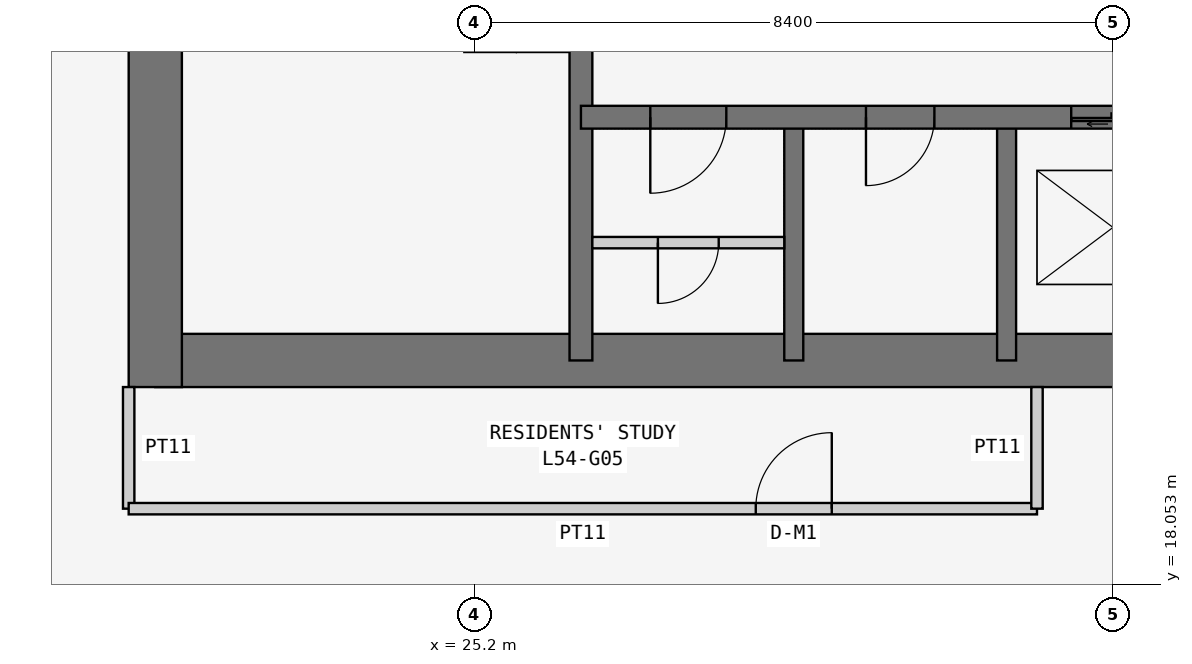
"""IFC4 building model, lengths in metres.
Left out: names, types, materials, properties, quantities, classifications, styles, units other than length and angle.
Written with IfcOpenShell. Run it as: python <this file> out.ifc"""

import sys

from ifc_helpers import new_model, si_unit, direction, frame, frame_2d, origin, place, context, subcontext, project, spatial, rectangle, extrude, element, fill, save


model = new_model("IFC4")
c1 = context("Model", 3, precision=1e-05, world=origin(), true_north=direction((0.0, 1.0)))
c2 = subcontext(c1, "Body", "Model", "MODEL_VIEW")
j1 = project(units=[si_unit("LENGTHUNIT", "METRE"), si_unit("PLANEANGLEUNIT", "RADIAN")], contexts=[c1])
p1 = place(None, origin())
s1 = spatial("IfcSite", under=j1, at=p1, CompositionType="ELEMENT")
p2 = place(p1, origin())
s2 = spatial("IfcBuilding", under=s1, at=p2, CompositionType="ELEMENT")
p3 = place(p2, frame((0.0, 0.0, 208.5)))
s3 = spatial("IfcBuildingStorey", under=s2, at=p3, CompositionType="ELEMENT", Elevation=208.5)
p4 = place(p3, frame((21.0, 21.0, 0.0), z_axis=(0.0, 0.0, 1.0), x_axis=(1.0, 0.0, 0.0)))
e1 = element("IfcWall", 1, at=p4, inside=s3, PredefinedType="SHEAR", context=c2, shape_type="SweptSolid", body=[
    extrude(rectangle(XDim=17.15, YDim=0.7, at=frame_2d((8.575, 0.0))), origin(), (0.0, 0.0, 1.0), 3.6),
])
p5 = place(p3, frame((21.0, 37.8, 0.0), z_axis=(0.0, 0.0, 1.0), x_axis=(0.0, -1.0, 0.0)))
e2 = element("IfcWall", 2, at=p5, inside=s3, PredefinedType="SHEAR", context=c2, shape_type="SweptSolid", body=[
    extrude(rectangle(XDim=17.15, YDim=0.7, at=frame_2d((8.575, 0.0))), origin(), (0.0, 0.0, 1.0), 3.6),
])
p6 = place(p5, frame((5.4, 0.0, 0.0)))
e3 = element("IfcOpeningElement", 3, at=p6, cuts=e2, PredefinedType="OPENING", context=c2, shape_type="SweptSolid", body=[
    extrude(rectangle(XDim=1.2, YDim=2.1, at=frame_2d((0.6, 1.05))), frame((0.0, 0.36, 0.0), z_axis=(0.0, -1.0, 0.0), x_axis=(1.0, 0.0, 0.0)), (0.0, 0.0, 1.0), 0.72),
])
p7 = place(p3, frame((26.6, 21.0, 0.0), z_axis=(0.0, 0.0, 1.0), x_axis=(0.0, 1.0, 0.0)))
e4 = element("IfcWall", 4, at=p7, inside=s3, PredefinedType="SHEAR", context=c2, shape_type="SweptSolid", body=[
    extrude(rectangle(XDim=16.8, YDim=0.3, at=frame_2d((8.4, 0.0))), origin(), (0.0, 0.0, 1.0), 3.6),
])
p8 = place(p7, frame((10.4, 0.0, 0.0)))
e5 = element("IfcOpeningElement", 5, at=p8, cuts=e4, PredefinedType="OPENING", context=c2, shape_type="SweptSolid", body=[
    extrude(rectangle(XDim=1.2, YDim=2.1, at=frame_2d((0.6, 1.05))), frame((0.0, 0.16, 0.0), z_axis=(0.0, -1.0, 0.0), x_axis=(1.0, 0.0, 0.0)), (0.0, 0.0, 1.0), 0.32),
])
p9 = place(p3, frame((26.6, 24.2, 0.0), z_axis=(0.0, 0.0, 1.0), x_axis=(1.0, 0.0, 0.0)))
e6 = element("IfcWall", 6, at=p9, inside=s3, PredefinedType="SHEAR", context=c2, shape_type="SweptSolid", body=[
    extrude(rectangle(XDim=11.2, YDim=0.3, at=frame_2d((5.6, 0.0))), origin(), (0.0, 0.0, 1.0), 3.6),
])
p10 = place(p9, frame((0.913, 0.0, 0.0)))
e7 = element("IfcOpeningElement", 7, at=p10, cuts=e6, PredefinedType="OPENING", context=c2, shape_type="SweptSolid", body=[
    extrude(rectangle(XDim=1.0, YDim=2.1, at=frame_2d((0.5, 1.05))), frame((0.0, 0.16, 0.0), z_axis=(0.0, -1.0, 0.0), x_axis=(1.0, 0.0, 0.0)), (0.0, 0.0, 1.0), 0.32),
])
p11 = place(p9, frame((3.75, 0.0, 0.0)))
e8 = element("IfcOpeningElement", 8, at=p11, cuts=e6, PredefinedType="OPENING", context=c2, shape_type="SweptSolid", body=[
    extrude(rectangle(XDim=0.9, YDim=2.1, at=frame_2d((0.45, 1.05))), frame((0.0, 0.16, 0.0), z_axis=(0.0, -1.0, 0.0), x_axis=(1.0, 0.0, 0.0)), (0.0, 0.0, 1.0), 0.32),
])
p12 = place(p9, frame((6.45, 0.0, 0.0)))
e9 = element("IfcOpeningElement", 9, at=p12, cuts=e6, PredefinedType="OPENING", context=c2, shape_type="SweptSolid", body=[
    extrude(rectangle(XDim=1.1, YDim=2.1, at=frame_2d((0.55, 1.05))), frame((0.0, 0.16, 0.0), z_axis=(0.0, -1.0, 0.0), x_axis=(1.0, 0.0, 0.0)), (0.0, 0.0, 1.0), 0.32),
])
p13 = place(p9, frame((9.1, 0.0, 0.0)))
e10 = element("IfcOpeningElement", 10, at=p13, cuts=e6, PredefinedType="OPENING", context=c2, shape_type="SweptSolid", body=[
    extrude(rectangle(XDim=1.1, YDim=2.1, at=frame_2d((0.55, 1.05))), frame((0.0, 0.16, 0.0), z_axis=(0.0, -1.0, 0.0), x_axis=(1.0, 0.0, 0.0)), (0.0, 0.0, 1.0), 0.32),
])
for number, where, z_axis, x_axis in (
    (11, (29.4, 21.0, 0.0), (0.0, 0.0, 1.0), (0.0, 1.0, 0.0)),
    (12, (32.2, 21.0, 0.0), (0.0, 0.0, 1.0), (0.0, 1.0, 0.0)),
):
    element("IfcWall", number, at=place(p3, frame(where, z_axis=z_axis, x_axis=x_axis)), inside=s3, PredefinedType="SHEAR", context=c2, shape_type="SweptSolid", body=[
        extrude(rectangle(XDim=3.2, YDim=0.25, at=frame_2d((1.6, 0.0))), origin(), (0.0, 0.0, 1.0), 3.6),
    ])
p14 = place(p3, frame((20.65, 20.65, 0.0), z_axis=(0.0, 0.0, 1.0), x_axis=(0.0, -1.0, 0.0)))
e13 = element("IfcWall", 13, at=p14, inside=s3, PredefinedType="PARTITIONING", context=c2, shape_type="SweptSolid", body=[
    extrude(rectangle(XDim=1.6, YDim=0.15, at=frame_2d((0.8, 0.0))), origin(), (0.0, 0.0, 1.0), 3.45),
])
p15 = place(p3, frame((20.65, 19.05, 0.0), z_axis=(0.0, 0.0, 1.0), x_axis=(1.0, 0.0, 0.0)))
e14 = element("IfcWall", 14, at=p15, inside=s3, PredefinedType="PARTITIONING", context=c2, shape_type="SweptSolid", body=[
    extrude(rectangle(XDim=11.95, YDim=0.15, at=frame_2d((5.975, 0.0))), origin(), (0.0, 0.0, 1.0), 3.45),
])
p16 = place(p15, frame((8.25, 0.0, 0.0)))
e15 = element("IfcOpeningElement", 15, at=p16, cuts=e14, PredefinedType="OPENING", context=c2, shape_type="SweptSolid", body=[
    extrude(rectangle(XDim=1.0, YDim=2.1, at=frame_2d((0.5, 1.05))), frame((0.0, 0.085, 0.0), z_axis=(0.0, -1.0, 0.0), x_axis=(1.0, 0.0, 0.0)), (0.0, 0.0, 1.0), 0.17),
])
p17 = place(p3, frame((32.6, 19.05, 0.0), z_axis=(0.0, 0.0, 1.0), x_axis=(0.0, 1.0, 0.0)))
e16 = element("IfcWall", 16, at=p17, inside=s3, PredefinedType="PARTITIONING", context=c2, shape_type="SweptSolid", body=[
    extrude(rectangle(XDim=1.6, YDim=0.15, at=frame_2d((0.8, 0.0))), origin(), (0.0, 0.0, 1.0), 3.45),
])
p18 = place(p3, frame((26.75, 22.55, 0.0), z_axis=(0.0, 0.0, 1.0), x_axis=(1.0, 0.0, 0.0)))
e17 = element("IfcWall", 17, at=p18, inside=s3, PredefinedType="PARTITIONING", context=c2, shape_type="SweptSolid", body=[
    extrude(rectangle(XDim=2.525, YDim=0.15, at=frame_2d((1.262, 0.0))), origin(), (0.0, 0.0, 1.0), 3.45),
])
p19 = place(p18, frame((0.863, 0.0, 0.0)))
e18 = element("IfcOpeningElement", 18, at=p19, cuts=e17, PredefinedType="OPENING", context=c2, shape_type="SweptSolid", body=[
    extrude(rectangle(XDim=0.8, YDim=2.1, at=frame_2d((0.4, 1.05))), frame((0.0, 0.085, 0.0), z_axis=(0.0, -1.0, 0.0), x_axis=(1.0, 0.0, 0.0)), (0.0, 0.0, 1.0), 0.17),
])
p20 = place(p16, origin())
e19 = element("IfcDoor", 19, at=p20, inside=s3, OperationType="SINGLE_SWING_RIGHT", PredefinedType="DOOR", context=c2, shape_type="SweptSolid", body=[
    extrude(rectangle(XDim=1.0, YDim=2.1, at=frame_2d((0.5, 1.05))), frame((0.0, 0.025, 0.0), z_axis=(0.0, -1.0, 0.0), x_axis=(1.0, 0.0, 0.0)), (0.0, 0.0, 1.0), 0.05),
])
fill(e15, e19)
p21 = place(p10, frame((1.0, 0.0, 0.0), z_axis=(0.0, 0.0, 1.0), x_axis=(-1.0, 0.0, 0.0)))
e20 = element("IfcDoor", 20, at=p21, inside=s3, OperationType="SINGLE_SWING_RIGHT", PredefinedType="DOOR", context=c2, shape_type="SweptSolid", body=[
    extrude(rectangle(XDim=1.0, YDim=2.1, at=frame_2d((0.5, 1.05))), frame((0.0, 0.025, 0.0), z_axis=(0.0, -1.0, 0.0), x_axis=(1.0, 0.0, 0.0)), (0.0, 0.0, 1.0), 0.05),
])
fill(e7, e20)
p22 = place(p19, frame((0.8, 0.0, 0.0), z_axis=(0.0, 0.0, 1.0), x_axis=(-1.0, 0.0, 0.0)))
e21 = element("IfcDoor", 21, at=p22, inside=s3, OperationType="SINGLE_SWING_RIGHT", PredefinedType="DOOR", context=c2, shape_type="SweptSolid", body=[
    extrude(rectangle(XDim=0.8, YDim=2.1, at=frame_2d((0.4, 1.05))), frame((0.0, 0.025, 0.0), z_axis=(0.0, -1.0, 0.0), x_axis=(1.0, 0.0, 0.0)), (0.0, 0.0, 1.0), 0.05),
])
fill(e18, e21)
p23 = place(p11, frame((0.9, 0.0, 0.0), z_axis=(0.0, 0.0, 1.0), x_axis=(-1.0, 0.0, 0.0)))
e22 = element("IfcDoor", 22, at=p23, inside=s3, OperationType="SINGLE_SWING_RIGHT", PredefinedType="DOOR", context=c2, shape_type="SweptSolid", body=[
    extrude(rectangle(XDim=0.9, YDim=2.1, at=frame_2d((0.45, 1.05))), frame((0.0, 0.025, 0.0), z_axis=(0.0, -1.0, 0.0), x_axis=(1.0, 0.0, 0.0)), (0.0, 0.0, 1.0), 0.05),
])
fill(e8, e22)
p24 = place(p12, origin())
e23 = element("IfcDoor", 23, at=p24, inside=s3, OperationType="DOUBLE_DOOR_SLIDING", PredefinedType="DOOR", context=c2, shape_type="SweptSolid", body=[
    extrude(rectangle(XDim=1.1, YDim=2.1, at=frame_2d((0.55, 1.05))), frame((0.0, 0.025, 0.0), z_axis=(0.0, -1.0, 0.0), x_axis=(1.0, 0.0, 0.0)), (0.0, 0.0, 1.0), 0.05),
])
fill(e9, e23)
save(model, sys.argv[1])
